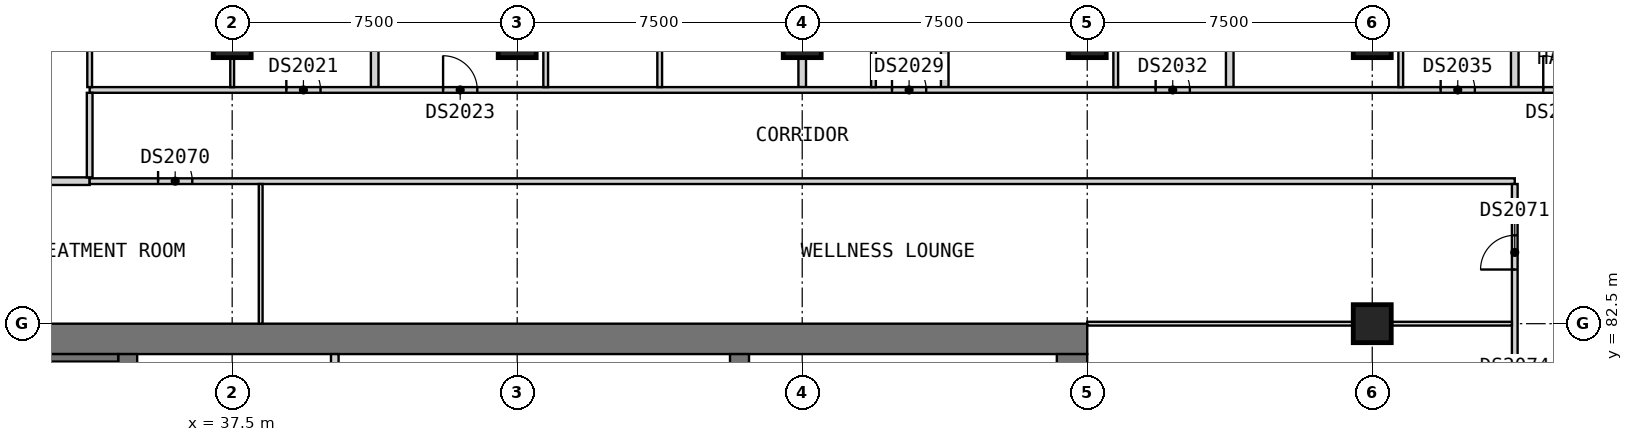
"""IFC4 building model, lengths in metres.
Left out: names, types, materials, properties, quantities, classifications, styles, units other than length and angle.
Written with IfcOpenShell. Run it as: python <this file> out.ifc"""

import sys

from ifc_helpers import new_model, si_unit, direction, frame, frame_2d, origin, origin_2d, place, context, subcontext, project, spatial, rectangle, extrude, element, fill, save


model = new_model("IFC4")
c1 = context("Model", 3, precision=1e-05, world=origin(), true_north=direction((0.0, 1.0)))
c2 = subcontext(c1, "Body", "Model", "MODEL_VIEW")
j1 = project(units=[si_unit("LENGTHUNIT", "METRE"), si_unit("PLANEANGLEUNIT", "RADIAN")], contexts=[c1])
p1 = place(None, origin())
s1 = spatial("IfcSite", under=j1, at=p1, CompositionType="ELEMENT")
p2 = place(p1, origin())
s2 = spatial("IfcBuilding", under=s1, at=p2, CompositionType="ELEMENT")
p3 = place(p2, frame((0.0, 0.0, 162.6)))
s3 = spatial("IfcBuildingStorey", under=s2, at=p3, CompositionType="ELEMENT", Elevation=162.6)
for number, where, z_axis, x_axis in (
    (1, (37.5, 90.0, 0.0), (0.0, 0.0, 1.0), (1.0, 0.0, 0.0)),
    (2, (45.0, 90.0, 0.0), (0.0, 0.0, 1.0), (1.0, 0.0, 0.0)),
    (3, (52.5, 90.0, 0.0), (0.0, 0.0, 1.0), (1.0, 0.0, 0.0)),
    (4, (60.0, 90.0, 0.0), (0.0, 0.0, 1.0), (1.0, 0.0, 0.0)),
    (5, (67.5, 82.5, 0.0), (0.0, 0.0, 1.0), (1.0, 0.0, 0.0)),
    (6, (67.5, 90.0, 0.0), (0.0, 0.0, 1.0), (1.0, 0.0, 0.0)),
):
    element("IfcColumn", number, at=place(p3, frame(where, z_axis=z_axis, x_axis=x_axis)), inside=s3, PredefinedType="COLUMN", context=c2, shape_type="SweptSolid", body=[
        extrude(rectangle(XDim=1.0, YDim=1.0, at=origin_2d()), origin(), (0.0, 0.0, 1.0), 3.6),
    ])
p4 = place(p3, frame((30.0, 82.1, 0.0), z_axis=(0.0, 0.0, 1.0), x_axis=(1.0, 0.0, 0.0)))
e7 = element("IfcWall", 7, at=p4, inside=s3, PredefinedType="SHEAR", context=c2, shape_type="SweptSolid", body=[
    extrude(rectangle(XDim=30.0, YDim=0.8, at=frame_2d((15.0, 0.0))), origin(), (0.0, 0.0, 1.0), 3.6),
])
p5 = place(p3, frame((59.6, 60.8, 0.0), z_axis=(0.0, 0.0, 1.0), x_axis=(0.0, 1.0, 0.0)))
e8 = element("IfcWall", 8, at=p5, inside=s3, PredefinedType="SHEAR", context=c2, shape_type="SweptSolid", body=[
    extrude(rectangle(XDim=20.9, YDim=0.8, at=frame_2d((10.45, 0.0))), origin(), (0.0, 0.0, 1.0), 3.6),
])
p6 = place(p5, frame((14.7, 0.0, 0.0)))
e9 = element("IfcOpeningElement", 9, at=p6, cuts=e8, PredefinedType="OPENING", context=c2, shape_type="SweptSolid", body=[
    extrude(rectangle(XDim=1.8, YDim=2.1, at=frame_2d((0.9, 1.05))), frame((0.0, 0.41, 0.0), z_axis=(0.0, -1.0, 0.0), x_axis=(1.0, 0.0, 0.0)), (0.0, 0.0, 1.0), 0.82),
])
for number, where, z_axis, x_axis in (
    (10, (34.75, 78.3, 0.0), (0.0, 0.0, 1.0), (0.0, 1.0, 0.0)),
    (11, (50.85, 78.3, 0.0), (0.0, 0.0, 1.0), (0.0, 1.0, 0.0)),
):
    element("IfcWall", number, at=place(p3, frame(where, z_axis=z_axis, x_axis=x_axis)), inside=s3, PredefinedType="SHEAR", context=c2, shape_type="SweptSolid", body=[
        extrude(rectangle(XDim=3.4, YDim=0.5, at=frame_2d((1.7, 0.0))), origin(), (0.0, 0.0, 1.0), 3.6),
    ])
p7 = place(p3, frame((40.2, 78.5, 0.0), z_axis=(0.0, 0.0, 1.0), x_axis=(0.0, 1.0, 0.0)))
e12 = element("IfcWall", 12, at=p7, inside=s3, PredefinedType="SOLIDWALL", context=c2, shape_type="SweptSolid", body=[
    extrude(rectangle(XDim=3.2, YDim=0.2, at=frame_2d((1.6, 0.0))), origin(), (0.0, 0.0, 1.0), 3.6),
])
p8 = place(p3, frame((31.0, 81.6, 0.0), z_axis=(0.0, 0.0, 1.0), x_axis=(1.0, 0.0, 0.0)))
e13 = element("IfcWall", 13, at=p8, inside=s3, PredefinedType="SOLIDWALL", context=c2, shape_type="SweptSolid", body=[
    extrude(rectangle(XDim=3.5, YDim=0.2, at=frame_2d((1.75, 0.0))), origin(), (0.0, 0.0, 1.0), 3.19),
])
p9 = place(p3, frame((30.81, 86.25, 0.0), z_axis=(0.0, 0.0, 1.0), x_axis=(1.0, 0.0, 0.0)))
e14 = element("IfcWall", 14, at=p9, inside=s3, PredefinedType="PARTITIONING", context=c2, shape_type="SweptSolid", body=[
    extrude(rectangle(XDim=2.94, YDim=0.2, at=frame_2d((1.47, 0.0))), origin(), (0.0, 0.0, 1.0), 3.2),
])
p10 = place(p3, frame((41.25, 88.725, 0.0), z_axis=(0.0, 0.0, 1.0), x_axis=(0.0, 1.0, 0.0)))
e15 = element("IfcWall", 15, at=p10, inside=s3, PredefinedType="PARTITIONING", context=c2, shape_type="SweptSolid", body=[
    extrude(rectangle(XDim=11.715, YDim=0.2, at=frame_2d((5.857, 0.0))), origin(), (0.0, 0.0, 1.0), 3.2),
])
p11 = place(p3, frame((52.5, 88.725, 0.0), z_axis=(0.0, 0.0, 1.0), x_axis=(0.0, 1.0, 0.0)))
e16 = element("IfcWall", 16, at=p11, inside=s3, PredefinedType="PARTITIONING", context=c2, shape_type="SweptSolid", body=[
    extrude(rectangle(XDim=12.525, YDim=0.2, at=frame_2d((6.262, 0.0))), origin(), (0.0, 0.0, 1.0), 3.2),
])
for number, where, z_axis, x_axis in (
    (17, (56.25, 88.725, 0.0), (0.0, 0.0, 1.0), (0.0, 1.0, 0.0)),
    (18, (63.75, 88.725, 0.0), (0.0, 0.0, 1.0), (0.0, 1.0, 0.0)),
    (19, (71.25, 88.725, 0.0), (0.0, 0.0, 1.0), (0.0, 1.0, 0.0)),
):
    element("IfcWall", number, at=place(p3, frame(where, z_axis=z_axis, x_axis=x_axis)), inside=s3, PredefinedType="PARTITIONING", context=c2, shape_type="SweptSolid", body=[
        extrude(rectangle(XDim=11.715, YDim=0.2, at=frame_2d((5.857, 0.0))), origin(), (0.0, 0.0, 1.0), 3.2),
    ])
p12 = place(p3, frame((33.75, 86.25, 0.0), z_axis=(0.0, 0.0, 1.0), x_axis=(1.0, 0.0, 0.0)))
e20 = element("IfcWall", 20, at=p12, inside=s3, PredefinedType="PARTITIONING", context=c2, shape_type="SweptSolid", body=[
    extrude(rectangle(XDim=37.5, YDim=0.15, at=frame_2d((18.75, 0.0))), origin(), (0.0, 0.0, 1.0), 3.2),
])
p13 = place(p12, frame((1.8, 0.0, 0.0)))
e21 = element("IfcOpeningElement", 21, at=p13, cuts=e20, PredefinedType="OPENING", context=c2, shape_type="SweptSolid", body=[
    extrude(rectangle(XDim=0.9, YDim=2.1, at=frame_2d((0.45, 1.05))), frame((0.0, 0.085, 0.0), z_axis=(0.0, -1.0, 0.0), x_axis=(1.0, 0.0, 0.0)), (0.0, 0.0, 1.0), 0.17),
])
p14 = place(p3, frame((33.75, 88.65, 0.0), z_axis=(0.0, 0.0, 1.0), x_axis=(1.0, 0.0, 0.0)))
e22 = element("IfcWall", 22, at=p14, inside=s3, PredefinedType="PARTITIONING", context=c2, shape_type="SweptSolid", body=[
    extrude(rectangle(XDim=39.9, YDim=0.15, at=frame_2d((19.95, 0.0))), origin(), (0.0, 0.0, 1.0), 3.2),
])
p15 = place(p14, frame((5.175, 0.0, 0.0)))
e23 = element("IfcOpeningElement", 23, at=p15, cuts=e22, PredefinedType="OPENING", context=c2, shape_type="SweptSolid", body=[
    extrude(rectangle(XDim=0.9, YDim=2.1, at=frame_2d((0.45, 1.05))), frame((0.0, 0.085, 0.0), z_axis=(0.0, -1.0, 0.0), x_axis=(1.0, 0.0, 0.0)), (0.0, 0.0, 1.0), 0.17),
])
p16 = place(p14, frame((9.3, 0.0, 0.0)))
e24 = element("IfcOpeningElement", 24, at=p16, cuts=e22, PredefinedType="OPENING", context=c2, shape_type="SweptSolid", body=[
    extrude(rectangle(XDim=0.9, YDim=2.1, at=frame_2d((0.45, 1.05))), frame((0.0, 0.085, 0.0), z_axis=(0.0, -1.0, 0.0), x_axis=(1.0, 0.0, 0.0)), (0.0, 0.0, 1.0), 0.17),
])
p17 = place(p14, frame((21.113, 0.0, 0.0)))
e25 = element("IfcOpeningElement", 25, at=p17, cuts=e22, PredefinedType="OPENING", context=c2, shape_type="SweptSolid", body=[
    extrude(rectangle(XDim=0.9, YDim=2.1, at=frame_2d((0.45, 1.05))), frame((0.0, 0.085, 0.0), z_axis=(0.0, -1.0, 0.0), x_axis=(1.0, 0.0, 0.0)), (0.0, 0.0, 1.0), 0.17),
])
p18 = place(p14, frame((28.05, 0.0, 0.0)))
e26 = element("IfcOpeningElement", 26, at=p18, cuts=e22, PredefinedType="OPENING", context=c2, shape_type="SweptSolid", body=[
    extrude(rectangle(XDim=0.9, YDim=2.1, at=frame_2d((0.45, 1.05))), frame((0.0, 0.085, 0.0), z_axis=(0.0, -1.0, 0.0), x_axis=(1.0, 0.0, 0.0)), (0.0, 0.0, 1.0), 0.17),
])
p19 = place(p14, frame((35.55, 0.0, 0.0)))
e27 = element("IfcOpeningElement", 27, at=p19, cuts=e22, PredefinedType="OPENING", context=c2, shape_type="SweptSolid", body=[
    extrude(rectangle(XDim=0.9, YDim=2.1, at=frame_2d((0.45, 1.05))), frame((0.0, 0.085, 0.0), z_axis=(0.0, -1.0, 0.0), x_axis=(1.0, 0.0, 0.0)), (0.0, 0.0, 1.0), 0.17),
])
p20 = place(p14, frame((38.25, 0.0, 0.0)))
e28 = element("IfcOpeningElement", 28, at=p20, cuts=e22, PredefinedType="OPENING", context=c2, shape_type="SweptSolid", body=[
    extrude(rectangle(XDim=0.9, YDim=2.1, at=frame_2d((0.45, 1.05))), frame((0.0, 0.085, 0.0), z_axis=(0.0, -1.0, 0.0), x_axis=(1.0, 0.0, 0.0)), (0.0, 0.0, 1.0), 0.17),
])
p21 = place(p3, frame((33.75, 86.35, 0.0), z_axis=(0.0, 0.0, 1.0), x_axis=(0.0, 1.0, 0.0)))
e29 = element("IfcWall", 29, at=p21, inside=s3, PredefinedType="PARTITIONING", context=c2, shape_type="SweptSolid", body=[
    extrude(rectangle(XDim=2.225, YDim=0.15, at=frame_2d((1.112, 0.0))), origin(), (0.0, 0.0, 1.0), 3.2),
])
p22 = place(p3, frame((71.25, 78.075, 0.0), z_axis=(0.0, 0.0, 1.0), x_axis=(0.0, 1.0, 0.0)))
e30 = element("IfcWall", 30, at=p22, inside=s3, PredefinedType="PARTITIONING", context=c2, shape_type="SweptSolid", body=[
    extrude(rectangle(XDim=8.1, YDim=0.15, at=frame_2d((4.05, 0.0))), origin(), (0.0, 0.0, 1.0), 3.2),
])
p23 = place(p22, frame((5.85, 0.0, 0.0)))
e31 = element("IfcOpeningElement", 31, at=p23, cuts=e30, PredefinedType="OPENING", context=c2, shape_type="SweptSolid", body=[
    extrude(rectangle(XDim=0.9, YDim=2.1, at=frame_2d((0.45, 1.05))), frame((0.0, 0.085, 0.0), z_axis=(0.0, -1.0, 0.0), x_axis=(1.0, 0.0, 0.0)), (0.0, 0.0, 1.0), 0.17),
])
p24 = place(p22, frame((1.725, 0.0, 0.0)))
e32 = element("IfcOpeningElement", 32, at=p24, cuts=e30, PredefinedType="OPENING", context=c2, shape_type="SweptSolid", body=[
    extrude(rectangle(XDim=0.9, YDim=2.1, at=frame_2d((0.45, 1.05))), frame((0.0, 0.085, 0.0), z_axis=(0.0, -1.0, 0.0), x_axis=(1.0, 0.0, 0.0)), (0.0, 0.0, 1.0), 0.17),
])
p25 = place(p3, frame((60.0, 82.5, 0.0), z_axis=(0.0, 0.0, 1.0), x_axis=(1.0, 0.0, 0.0)))
e33 = element("IfcWall", 33, at=p25, inside=s3, PredefinedType="PARTITIONING", context=c2, shape_type="SweptSolid", body=[
    extrude(rectangle(XDim=11.175, YDim=0.1, at=frame_2d((5.587, 0.0))), origin(), (0.0, 0.0, 1.0), 3.2),
])
p26 = place(p3, frame((37.5, 88.725, 0.0), z_axis=(0.0, 0.0, 1.0), x_axis=(0.0, 1.0, 0.0)))
e34 = element("IfcWall", 34, at=p26, inside=s3, PredefinedType="PARTITIONING", context=c2, shape_type="SweptSolid", body=[
    extrude(rectangle(XDim=4.725, YDim=0.1, at=frame_2d((2.362, 0.0))), origin(), (0.0, 0.0, 1.0), 3.2),
])
p27 = place(p26, frame((1.9, 0.0, 0.0)))
e35 = element("IfcOpeningElement", 35, at=p27, cuts=e34, PredefinedType="OPENING", context=c2, shape_type="SweptSolid", body=[
    extrude(rectangle(XDim=0.9, YDim=2.1, at=frame_2d((0.45, 1.05))), frame((0.0, 0.06, 0.0), z_axis=(0.0, -1.0, 0.0), x_axis=(1.0, 0.0, 0.0)), (0.0, 0.0, 1.0), 0.12),
])
p28 = place(p3, frame((38.25, 82.5, 0.0), z_axis=(0.0, 0.0, 1.0), x_axis=(0.0, 1.0, 0.0)))
e36 = element("IfcWall", 36, at=p28, inside=s3, PredefinedType="PARTITIONING", context=c2, shape_type="SweptSolid", body=[
    extrude(rectangle(XDim=3.675, YDim=0.1, at=frame_2d((1.837, 0.0))), origin(), (0.0, 0.0, 1.0), 3.2),
])
p29 = place(p3, frame((33.75, 88.725, 0.0), z_axis=(0.0, 0.0, 1.0), x_axis=(0.0, 1.0, 0.0)))
e37 = element("IfcWall", 37, at=p29, inside=s3, PredefinedType="PARTITIONING", context=c2, shape_type="SweptSolid", body=[
    extrude(rectangle(XDim=4.712, YDim=0.125, at=frame_2d((2.356, 0.0))), origin(), (0.0, 0.0, 1.0), 3.2),
])
p30 = place(p3, frame((45.75, 88.725, 0.0), z_axis=(0.0, 0.0, 1.0), x_axis=(0.0, 1.0, 0.0)))
e38 = element("IfcWall", 38, at=p30, inside=s3, PredefinedType="PARTITIONING", context=c2, shape_type="SweptSolid", body=[
    extrude(rectangle(XDim=4.712, YDim=0.125, at=frame_2d((2.356, 0.0))), origin(), (0.0, 0.0, 1.0), 3.2),
])
p31 = place(p30, frame((1.9, 0.0, 0.0)))
e39 = element("IfcOpeningElement", 39, at=p31, cuts=e38, PredefinedType="OPENING", context=c2, shape_type="SweptSolid", body=[
    extrude(rectangle(XDim=0.9, YDim=2.1, at=frame_2d((0.45, 1.05))), frame((0.0, 0.073, 0.0), z_axis=(0.0, -1.0, 0.0), x_axis=(1.0, 0.0, 0.0)), (0.0, 0.0, 1.0), 0.145),
])
for number, where, z_axis, x_axis in (
    (40, (48.75, 88.725, 0.0), (0.0, 0.0, 1.0), (0.0, 1.0, 0.0)),
    (41, (54.375, 88.725, 0.0), (0.0, 0.0, 1.0), (0.0, 1.0, 0.0)),
    (42, (60.75, 88.725, 0.0), (0.0, 0.0, 1.0), (0.0, 1.0, 0.0)),
    (43, (68.25, 88.725, 0.0), (0.0, 0.0, 1.0), (0.0, 1.0, 0.0)),
):
    element("IfcWall", number, at=place(p3, frame(where, z_axis=z_axis, x_axis=x_axis)), inside=s3, PredefinedType="PARTITIONING", context=c2, shape_type="SweptSolid", body=[
        extrude(rectangle(XDim=4.712, YDim=0.125, at=frame_2d((2.356, 0.0))), origin(), (0.0, 0.0, 1.0), 3.2),
    ])
p32 = place(p15, origin())
e44 = element("IfcDoor", 44, at=p32, inside=s3, OperationType="SINGLE_SWING_LEFT", PredefinedType="DOOR", context=c2, shape_type="SweptSolid", body=[
    extrude(rectangle(XDim=0.9, YDim=2.1, at=frame_2d((0.45, 1.05))), frame((0.0, 0.025, 0.0), z_axis=(0.0, -1.0, 0.0), x_axis=(1.0, 0.0, 0.0)), (0.0, 0.0, 1.0), 0.05),
])
fill(e23, e44)
p33 = place(p16, origin())
e45 = element("IfcDoor", 45, at=p33, inside=s3, OperationType="SINGLE_SWING_LEFT", PredefinedType="DOOR", context=c2, shape_type="SweptSolid", body=[
    extrude(rectangle(XDim=0.9, YDim=2.1, at=frame_2d((0.45, 1.05))), frame((0.0, 0.025, 0.0), z_axis=(0.0, -1.0, 0.0), x_axis=(1.0, 0.0, 0.0)), (0.0, 0.0, 1.0), 0.05),
])
fill(e24, e45)
p34 = place(p17, origin())
e46 = element("IfcDoor", 46, at=p34, inside=s3, OperationType="SINGLE_SWING_LEFT", PredefinedType="DOOR", context=c2, shape_type="SweptSolid", body=[
    extrude(rectangle(XDim=0.9, YDim=2.1, at=frame_2d((0.45, 1.05))), frame((0.0, 0.025, 0.0), z_axis=(0.0, -1.0, 0.0), x_axis=(1.0, 0.0, 0.0)), (0.0, 0.0, 1.0), 0.05),
])
fill(e25, e46)
p35 = place(p18, origin())
e47 = element("IfcDoor", 47, at=p35, inside=s3, OperationType="SINGLE_SWING_LEFT", PredefinedType="DOOR", context=c2, shape_type="SweptSolid", body=[
    extrude(rectangle(XDim=0.9, YDim=2.1, at=frame_2d((0.45, 1.05))), frame((0.0, 0.025, 0.0), z_axis=(0.0, -1.0, 0.0), x_axis=(1.0, 0.0, 0.0)), (0.0, 0.0, 1.0), 0.05),
])
fill(e26, e47)
p36 = place(p19, origin())
e48 = element("IfcDoor", 48, at=p36, inside=s3, OperationType="SINGLE_SWING_LEFT", PredefinedType="DOOR", context=c2, shape_type="SweptSolid", body=[
    extrude(rectangle(XDim=0.9, YDim=2.1, at=frame_2d((0.45, 1.05))), frame((0.0, 0.025, 0.0), z_axis=(0.0, -1.0, 0.0), x_axis=(1.0, 0.0, 0.0)), (0.0, 0.0, 1.0), 0.05),
])
fill(e27, e48)
p37 = place(p20, origin())
e49 = element("IfcDoor", 49, at=p37, inside=s3, OperationType="SINGLE_SWING_RIGHT", PredefinedType="DOOR", context=c2, shape_type="SweptSolid", body=[
    extrude(rectangle(XDim=0.9, YDim=2.1, at=frame_2d((0.45, 1.05))), frame((0.0, 0.025, 0.0), z_axis=(0.0, -1.0, 0.0), x_axis=(1.0, 0.0, 0.0)), (0.0, 0.0, 1.0), 0.05),
])
fill(e28, e49)
p38 = place(p13, origin())
e50 = element("IfcDoor", 50, at=p38, inside=s3, OperationType="SINGLE_SWING_RIGHT", PredefinedType="DOOR", context=c2, shape_type="SweptSolid", body=[
    extrude(rectangle(XDim=0.9, YDim=2.1, at=frame_2d((0.45, 1.05))), frame((0.0, 0.025, 0.0), z_axis=(0.0, -1.0, 0.0), x_axis=(1.0, 0.0, 0.0)), (0.0, 0.0, 1.0), 0.05),
])
fill(e21, e50)
p39 = place(p23, origin())
e51 = element("IfcDoor", 51, at=p39, inside=s3, OperationType="SINGLE_SWING_LEFT", PredefinedType="DOOR", context=c2, shape_type="SweptSolid", body=[
    extrude(rectangle(XDim=0.9, YDim=2.1, at=frame_2d((0.45, 1.05))), frame((0.0, 0.025, 0.0), z_axis=(0.0, -1.0, 0.0), x_axis=(1.0, 0.0, 0.0)), (0.0, 0.0, 1.0), 0.05),
])
fill(e31, e51)
save(model, sys.argv[1])
